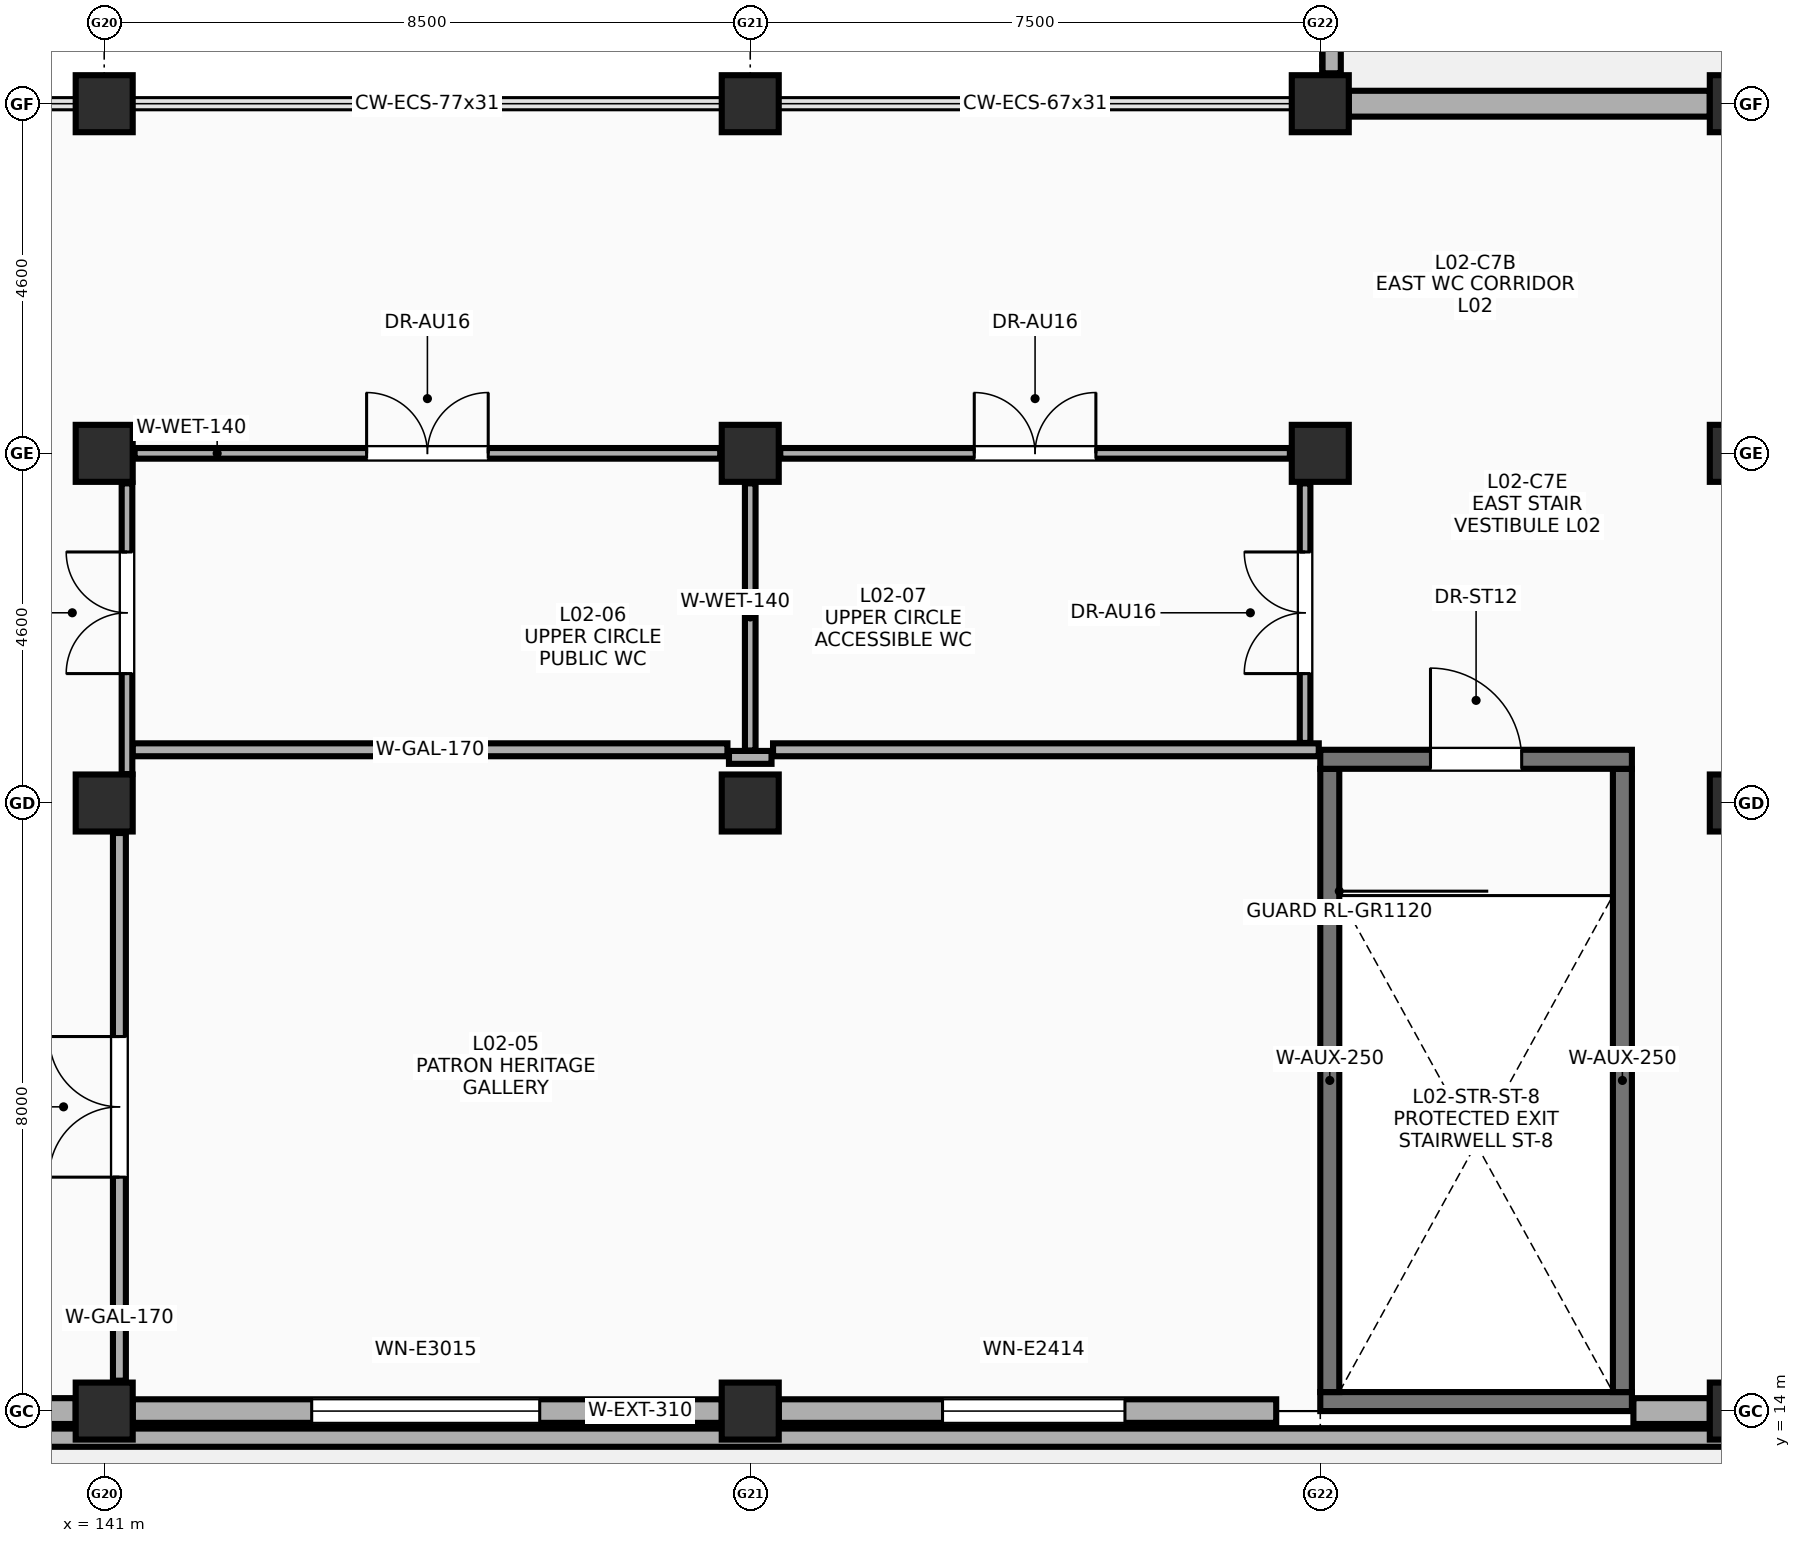
"""IFC4 building model, lengths in metres.
Left out: names, types, materials, properties, quantities, classifications, styles, units other than length and angle.
Written with IfcOpenShell. Run it as: python <this file> out.ifc"""

import sys

from ifc_helpers import new_model, si_unit, direction, frame, frame_2d, origin, origin_2d, place, context, subcontext, project, spatial, rectangle, extrude, element, fill, save


model = new_model("IFC4")
c1 = context("Model", 3, precision=1e-05, world=origin(), true_north=direction((0.0, 1.0)))
c2 = subcontext(c1, "Body", "Model", "MODEL_VIEW")
j1 = project(units=[si_unit("LENGTHUNIT", "METRE"), si_unit("PLANEANGLEUNIT", "RADIAN")], contexts=[c1])
p1 = place(None, origin())
s1 = spatial("IfcSite", under=j1, at=p1, CompositionType="ELEMENT")
p2 = place(p1, origin())
s2 = spatial("IfcBuilding", under=s1, at=p2, CompositionType="ELEMENT")
p3 = place(p2, frame((0.0, 0.0, 9.8)))
s3 = spatial("IfcBuildingStorey", under=s2, at=p3, CompositionType="ELEMENT", Elevation=9.8)
for number, where, z_axis, x_axis in (
    (1, (141.0, 14.0, 0.0), (0.0, 0.0, 1.0), (1.0, 0.0, 0.0)),
    (2, (141.0, 22.0, 0.0), (0.0, 0.0, 1.0), (1.0, 0.0, 0.0)),
    (3, (141.0, 26.6, 0.0), (0.0, 0.0, 1.0), (1.0, 0.0, 0.0)),
    (4, (141.0, 31.2, 0.0), (0.0, 0.0, 1.0), (1.0, 0.0, 0.0)),
    (5, (149.5, 14.0, 0.0), (0.0, 0.0, 1.0), (1.0, 0.0, 0.0)),
    (6, (149.5, 22.0, 0.0), (0.0, 0.0, 1.0), (1.0, 0.0, 0.0)),
    (7, (149.5, 26.6, 0.0), (0.0, 0.0, 1.0), (1.0, 0.0, 0.0)),
    (8, (149.5, 31.2, 0.0), (0.0, 0.0, 1.0), (1.0, 0.0, 0.0)),
    (9, (157.0, 26.6, 0.0), (0.0, 0.0, 1.0), (1.0, 0.0, 0.0)),
    (10, (157.0, 31.2, 0.0), (0.0, 0.0, 1.0), (1.0, 0.0, 0.0)),
    (11, (162.5, 14.0, 0.0), (0.0, 0.0, 1.0), (1.0, 0.0, 0.0)),
    (12, (162.5, 22.0, 0.0), (0.0, 0.0, 1.0), (1.0, 0.0, 0.0)),
    (13, (162.5, 26.6, 0.0), (0.0, 0.0, 1.0), (1.0, 0.0, 0.0)),
    (14, (162.5, 31.2, 0.0), (0.0, 0.0, 1.0), (1.0, 0.0, 0.0)),
):
    element("IfcColumn", number, at=place(p3, frame(where, z_axis=z_axis, x_axis=x_axis)), inside=s3, PredefinedType="COLUMN", context=c2, shape_type="SweptSolid", body=[
        extrude(rectangle(XDim=0.75, YDim=0.75, at=origin_2d()), origin(), (0.0, 0.0, 1.0), 4.4),
    ])
p4 = place(p3, frame((141.375, 14.0, 0.0), z_axis=(0.0, 0.0, 1.0), x_axis=(1.0, 0.0, 0.0)))
e15 = element("IfcWall", 15, at=p4, inside=s3, PredefinedType="SOLIDWALL", context=c2, shape_type="SweptSolid", body=[
    extrude(rectangle(XDim=7.75, YDim=0.31, at=frame_2d((3.875, 0.0))), origin(), (0.0, 0.0, 1.0), 3.15),
])
p5 = place(p4, frame((2.355, 0.0, 1.15)))
e16 = element("IfcOpeningElement", 16, at=p5, cuts=e15, PredefinedType="OPENING", context=c2, shape_type="SweptSolid", body=[
    extrude(rectangle(XDim=3.0, YDim=1.5, at=frame_2d((1.5, 0.75))), frame((0.0, 0.165, 0.0), z_axis=(0.0, -1.0, 0.0), x_axis=(1.0, 0.0, 0.0)), (0.0, 0.0, 1.0), 0.33),
])
p6 = place(p3, frame((149.875, 14.0, 0.0), z_axis=(0.0, 0.0, 1.0), x_axis=(1.0, 0.0, 0.0)))
e17 = element("IfcWall", 17, at=p6, inside=s3, PredefinedType="SOLIDWALL", context=c2, shape_type="SweptSolid", body=[
    extrude(rectangle(XDim=6.545, YDim=0.31, at=frame_2d((3.272, 0.0))), origin(), (0.0, 0.0, 1.0), 3.1),
])
p7 = place(p6, frame((2.155, 0.0, 1.15)))
e18 = element("IfcOpeningElement", 18, at=p7, cuts=e17, PredefinedType="OPENING", context=c2, shape_type="SweptSolid", body=[
    extrude(rectangle(XDim=2.4, YDim=1.4, at=frame_2d((1.2, 0.7))), frame((0.0, 0.165, 0.0), z_axis=(0.0, -1.0, 0.0), x_axis=(1.0, 0.0, 0.0)), (0.0, 0.0, 1.0), 0.33),
])
p8 = place(p3, frame((157.375, 31.2, 0.0), z_axis=(0.0, 0.0, 1.0), x_axis=(1.0, 0.0, 0.0)))
e19 = element("IfcWall", 19, at=p8, inside=s3, PredefinedType="SOLIDWALL", context=c2, shape_type="SweptSolid", body=[
    extrude(rectangle(XDim=4.75, YDim=0.34, at=frame_2d((2.375, 0.0))), origin(), (0.0, 0.0, 1.0), 3.15),
])
p9 = place(p3, frame((133.0, 14.0, 0.0), z_axis=(0.0, 0.0, 1.0), x_axis=(1.0, 0.0, 0.0)))
e20 = element("IfcWall", 20, at=p9, inside=s3, PredefinedType="SOLIDWALL", context=c2, shape_type="SweptSolid", body=[
    extrude(rectangle(XDim=7.625, YDim=0.34, at=frame_2d((3.812, 0.0))), origin(), (0.0, 0.0, 1.0), 3.15),
])
p10 = place(p3, frame((133.95, 13.65, 0.0), z_axis=(0.0, 0.0, 1.0), x_axis=(1.0, 0.0, 0.0)))
e21 = element("IfcWall", 21, at=p10, inside=s3, PredefinedType="PARAPET", context=c2, shape_type="SweptSolid", body=[
    extrude(rectangle(XDim=35.9, YDim=0.24, at=frame_2d((17.95, 0.0))), origin(), (0.0, 0.0, 1.0), 0.65),
])
p11 = place(p3, frame((157.0, 14.125, 0.0), z_axis=(0.0, 0.0, 1.0), x_axis=(1.0, 0.0, 0.0)))
e22 = element("IfcWall", 22, at=p11, inside=s3, PredefinedType="SHEAR", context=c2, shape_type="SweptSolid", body=[
    extrude(rectangle(XDim=4.1, YDim=0.25, at=frame_2d((2.05, 0.0))), origin(), (0.0, 0.0, 1.0), 4.4),
])
for number, where, z_axis, x_axis in (
    (23, (157.125, 14.25, 0.0), (0.0, 0.0, 1.0), (0.0, 1.0, 0.0)),
    (24, (160.975, 14.25, 0.0), (0.0, 0.0, 1.0), (0.0, 1.0, 0.0)),
):
    element("IfcWall", number, at=place(p3, frame(where, z_axis=z_axis, x_axis=x_axis)), inside=s3, PredefinedType="SHEAR", context=c2, shape_type="SweptSolid", body=[
        extrude(rectangle(XDim=8.2, YDim=0.25, at=frame_2d((4.1, 0.0))), origin(), (0.0, 0.0, 1.0), 4.4),
    ])
p12 = place(p3, frame((157.0, 22.575, 0.0), z_axis=(0.0, 0.0, 1.0), x_axis=(1.0, 0.0, 0.0)))
e25 = element("IfcWall", 25, at=p12, inside=s3, PredefinedType="SHEAR", context=c2, shape_type="SweptSolid", body=[
    extrude(rectangle(XDim=4.1, YDim=0.25, at=frame_2d((2.05, 0.0))), origin(), (0.0, 0.0, 1.0), 4.4),
])
p13 = place(p12, frame((1.45, 0.0, 0.0)))
e26 = element("IfcOpeningElement", 26, at=p13, cuts=e25, PredefinedType="OPENING", context=c2, shape_type="SweptSolid", body=[
    extrude(rectangle(XDim=1.2, YDim=2.15, at=frame_2d((0.6, 1.075))), frame((0.0, 0.135, 0.0), z_axis=(0.0, -1.0, 0.0), x_axis=(1.0, 0.0, 0.0)), (0.0, 0.0, 1.0), 0.27),
])
p14 = place(p3, frame((141.375, 22.7, 0.0), z_axis=(0.0, 0.0, 1.0), x_axis=(1.0, 0.0, 0.0)))
e27 = element("IfcWall", 27, at=p14, inside=s3, PredefinedType="PARTITIONING", context=c2, shape_type="SweptSolid", body=[
    extrude(rectangle(XDim=7.825, YDim=0.17, at=frame_2d((3.913, 0.0))), origin(), (0.0, 0.0, 1.0), 3.53),
])
p15 = place(p3, frame((141.2, 14.4, 0.0), z_axis=(0.0, 0.0, 1.0), x_axis=(0.0, 1.0, 0.0)))
e28 = element("IfcWall", 28, at=p15, inside=s3, PredefinedType="PARTITIONING", context=c2, shape_type="SweptSolid", body=[
    extrude(rectangle(XDim=7.205, YDim=0.17, at=frame_2d((3.603, 0.0))), origin(), (0.0, 0.0, 1.0), 3.33),
])
p16 = place(p15, frame((2.677, 0.0, 0.0)))
e29 = element("IfcOpeningElement", 29, at=p16, cuts=e28, PredefinedType="OPENING", context=c2, shape_type="SweptSolid", body=[
    extrude(rectangle(XDim=1.85, YDim=2.3, at=frame_2d((0.925, 1.15))), frame((0.0, 0.095, 0.0), z_axis=(0.0, -1.0, 0.0), x_axis=(1.0, 0.0, 0.0)), (0.0, 0.0, 1.0), 0.19),
])
p17 = place(p3, frame((149.5, 22.69, 0.0), z_axis=(0.0, 0.0, 1.0), x_axis=(0.0, 1.0, 0.0)))
e30 = element("IfcWall", 30, at=p17, inside=s3, PredefinedType="PARTITIONING", context=c2, shape_type="SweptSolid", body=[
    extrude(rectangle(XDim=3.515, YDim=0.14, at=frame_2d((1.758, 0.0))), origin(), (0.0, 0.0, 1.0), 3.53),
])
p18 = place(p3, frame((141.3, 22.38, 0.0), z_axis=(0.0, 0.0, 1.0), x_axis=(0.0, 1.0, 0.0)))
e31 = element("IfcWall", 31, at=p18, inside=s3, PredefinedType="PARTITIONING", context=c2, shape_type="SweptSolid", body=[
    extrude(rectangle(XDim=3.825, YDim=0.14, at=frame_2d((1.913, 0.0))), origin(), (0.0, 0.0, 1.0), 3.53),
])
p19 = place(p18, frame((1.323, 0.0, 0.0)))
e32 = element("IfcOpeningElement", 32, at=p19, cuts=e31, PredefinedType="OPENING", context=c2, shape_type="SweptSolid", body=[
    extrude(rectangle(XDim=1.6, YDim=2.25, at=frame_2d((0.8, 1.125))), frame((0.0, 0.08, 0.0), z_axis=(0.0, -1.0, 0.0), x_axis=(1.0, 0.0, 0.0)), (0.0, 0.0, 1.0), 0.16),
])
p20 = place(p3, frame((141.4, 26.6, 0.0), z_axis=(0.0, 0.0, 1.0), x_axis=(1.0, 0.0, 0.0)))
e33 = element("IfcWall", 33, at=p20, inside=s3, PredefinedType="PARTITIONING", context=c2, shape_type="SweptSolid", body=[
    extrude(rectangle(XDim=7.705, YDim=0.14, at=frame_2d((3.853, 0.0))), origin(), (0.0, 0.0, 1.0), 3.33),
])
p21 = place(p20, frame((3.052, 0.0, 0.0)))
e34 = element("IfcOpeningElement", 34, at=p21, cuts=e33, PredefinedType="OPENING", context=c2, shape_type="SweptSolid", body=[
    extrude(rectangle(XDim=1.6, YDim=2.25, at=frame_2d((0.8, 1.125))), frame((0.0, 0.08, 0.0), z_axis=(0.0, -1.0, 0.0), x_axis=(1.0, 0.0, 0.0)), (0.0, 0.0, 1.0), 0.16),
])
p22 = place(p3, frame((149.895, 26.6, 0.0), z_axis=(0.0, 0.0, 1.0), x_axis=(1.0, 0.0, 0.0)))
e35 = element("IfcWall", 35, at=p22, inside=s3, PredefinedType="PARTITIONING", context=c2, shape_type="SweptSolid", body=[
    extrude(rectangle(XDim=6.705, YDim=0.14, at=frame_2d((3.353, 0.0))), origin(), (0.0, 0.0, 1.0), 3.33),
])
p23 = place(p22, frame((2.552, 0.0, 0.0)))
e36 = element("IfcOpeningElement", 36, at=p23, cuts=e35, PredefinedType="OPENING", context=c2, shape_type="SweptSolid", body=[
    extrude(rectangle(XDim=1.6, YDim=2.25, at=frame_2d((0.8, 1.125))), frame((0.0, 0.08, 0.0), z_axis=(0.0, -1.0, 0.0), x_axis=(1.0, 0.0, 0.0)), (0.0, 0.0, 1.0), 0.16),
])
p24 = place(p3, frame((156.8, 22.79, 0.0), z_axis=(0.0, 0.0, 1.0), x_axis=(0.0, 1.0, 0.0)))
e37 = element("IfcWall", 37, at=p24, inside=s3, PredefinedType="PARTITIONING", context=c2, shape_type="SweptSolid", body=[
    extrude(rectangle(XDim=3.415, YDim=0.14, at=frame_2d((1.708, 0.0))), origin(), (0.0, 0.0, 1.0), 4.1),
])
p25 = place(p24, frame((0.913, 0.0, 0.0)))
e38 = element("IfcOpeningElement", 38, at=p25, cuts=e37, PredefinedType="OPENING", context=c2, shape_type="SweptSolid", body=[
    extrude(rectangle(XDim=1.6, YDim=2.25, at=frame_2d((0.8, 1.125))), frame((0.0, 0.08, 0.0), z_axis=(0.0, -1.0, 0.0), x_axis=(1.0, 0.0, 0.0)), (0.0, 0.0, 1.0), 0.16),
])
p26 = place(p3, frame((161.12, 14.0, 0.0), z_axis=(0.0, 0.0, 1.0), x_axis=(1.0, 0.0, 0.0)))
e39 = element("IfcWall", 39, at=p26, inside=s3, PredefinedType="SOLIDWALL", context=c2, shape_type="SweptSolid", body=[
    extrude(rectangle(XDim=1.005, YDim=0.34, at=frame_2d((0.502, 0.0))), origin(), (0.0, 0.0, 1.0), 3.1),
])
p27 = place(p3, frame((149.8, 22.7, 0.0), z_axis=(0.0, 0.0, 1.0), x_axis=(1.0, 0.0, 0.0)))
e40 = element("IfcWall", 40, at=p27, inside=s3, PredefinedType="PARTITIONING", context=c2, shape_type="SweptSolid", body=[
    extrude(rectangle(XDim=7.18, YDim=0.17, at=frame_2d((3.59, 0.0))), origin(), (0.0, 0.0, 1.0), 3.53),
])
p28 = place(p3, frame((149.22, 22.6, 0.0), z_axis=(0.0, 0.0, 1.0), x_axis=(1.0, 0.0, 0.0)))
e41 = element("IfcWall", 41, at=p28, inside=s3, PredefinedType="PARTITIONING", context=c2, shape_type="SweptSolid", body=[
    extrude(rectangle(XDim=0.56, YDim=0.17, at=frame_2d((0.28, 0.0))), origin(), (0.0, 0.0, 1.0), 3.53),
])
p29 = place(p3, frame((157.15, 31.6, 0.0), z_axis=(0.0, 0.0, 1.0), x_axis=(0.0, 1.0, 0.0)))
e42 = element("IfcWall", 42, at=p29, inside=s3, PredefinedType="PARAPET", context=c2, shape_type="SweptSolid", body=[
    extrude(rectangle(XDim=22.955, YDim=0.24, at=frame_2d((11.478, 0.0))), origin(), (0.0, 0.0, 1.0), 0.65),
])
p30 = place(p3, frame((162.145, 31.35, 0.0), z_axis=(0.0, 0.0, 1.0), x_axis=(1.0, 0.0, 0.0)))
e43 = element("IfcWall", 43, at=p30, inside=s3, PredefinedType="PARAPET", context=c2, shape_type="SweptSolid", body=[
    extrude(rectangle(XDim=0.71, YDim=0.24, at=frame_2d((0.355, 0.0))), origin(), (0.0, 0.0, 1.0), 0.65),
])
p31 = place(p5, origin())
e44 = element("IfcWindow", 44, at=p31, inside=s3, PartitioningType="SINGLE_PANEL", PredefinedType="WINDOW", context=c2, shape_type="SweptSolid", body=[
    extrude(rectangle(XDim=3.0, YDim=1.5, at=frame_2d((1.5, 0.75))), frame((0.0, 0.03, 0.0), z_axis=(0.0, -1.0, 0.0), x_axis=(1.0, 0.0, 0.0)), (0.0, 0.0, 1.0), 0.06),
])
fill(e16, e44)
p32 = place(p7, origin())
e45 = element("IfcWindow", 45, at=p32, inside=s3, PartitioningType="SINGLE_PANEL", PredefinedType="WINDOW", context=c2, shape_type="SweptSolid", body=[
    extrude(rectangle(XDim=2.4, YDim=1.4, at=frame_2d((1.2, 0.7))), frame((0.0, 0.03, 0.0), z_axis=(0.0, -1.0, 0.0), x_axis=(1.0, 0.0, 0.0)), (0.0, 0.0, 1.0), 0.06),
])
fill(e18, e45)
p33 = place(p13, origin())
e46 = element("IfcDoor", 46, at=p33, inside=s3, OperationType="SINGLE_SWING_LEFT", PredefinedType="DOOR", context=c2, shape_type="SweptSolid", body=[
    extrude(rectangle(XDim=1.2, YDim=2.15, at=frame_2d((0.6, 1.075))), frame((0.0, 0.025, 0.0), z_axis=(0.0, -1.0, 0.0), x_axis=(1.0, 0.0, 0.0)), (0.0, 0.0, 1.0), 0.05),
])
fill(e26, e46)
p34 = place(p16, origin())
e47 = element("IfcDoor", 47, at=p34, inside=s3, OperationType="DOUBLE_DOOR_SINGLE_SWING", PredefinedType="DOOR", context=c2, shape_type="SweptSolid", body=[
    extrude(rectangle(XDim=1.85, YDim=2.3, at=frame_2d((0.925, 1.15))), frame((0.0, 0.025, 0.0), z_axis=(0.0, -1.0, 0.0), x_axis=(1.0, 0.0, 0.0)), (0.0, 0.0, 1.0), 0.05),
])
fill(e29, e47)
p35 = place(p19, origin())
e48 = element("IfcDoor", 48, at=p35, inside=s3, OperationType="DOUBLE_DOOR_SINGLE_SWING", PredefinedType="DOOR", context=c2, shape_type="SweptSolid", body=[
    extrude(rectangle(XDim=1.6, YDim=2.25, at=frame_2d((0.8, 1.125))), frame((0.0, 0.025, 0.0), z_axis=(0.0, -1.0, 0.0), x_axis=(1.0, 0.0, 0.0)), (0.0, 0.0, 1.0), 0.05),
])
fill(e32, e48)
p36 = place(p21, origin())
e49 = element("IfcDoor", 49, at=p36, inside=s3, OperationType="DOUBLE_DOOR_SINGLE_SWING", PredefinedType="DOOR", context=c2, shape_type="SweptSolid", body=[
    extrude(rectangle(XDim=1.6, YDim=2.25, at=frame_2d((0.8, 1.125))), frame((0.0, 0.025, 0.0), z_axis=(0.0, -1.0, 0.0), x_axis=(1.0, 0.0, 0.0)), (0.0, 0.0, 1.0), 0.05),
])
fill(e34, e49)
p37 = place(p23, origin())
e50 = element("IfcDoor", 50, at=p37, inside=s3, OperationType="DOUBLE_DOOR_SINGLE_SWING", PredefinedType="DOOR", context=c2, shape_type="SweptSolid", body=[
    extrude(rectangle(XDim=1.6, YDim=2.25, at=frame_2d((0.8, 1.125))), frame((0.0, 0.025, 0.0), z_axis=(0.0, -1.0, 0.0), x_axis=(1.0, 0.0, 0.0)), (0.0, 0.0, 1.0), 0.05),
])
fill(e36, e50)
p38 = place(p25, origin())
e51 = element("IfcDoor", 51, at=p38, inside=s3, OperationType="DOUBLE_DOOR_SINGLE_SWING", PredefinedType="DOOR", context=c2, shape_type="SweptSolid", body=[
    extrude(rectangle(XDim=1.6, YDim=2.25, at=frame_2d((0.8, 1.125))), frame((0.0, 0.025, 0.0), z_axis=(0.0, -1.0, 0.0), x_axis=(1.0, 0.0, 0.0)), (0.0, 0.0, 1.0), 0.05),
])
fill(e38, e51)
save(model, sys.argv[1])
